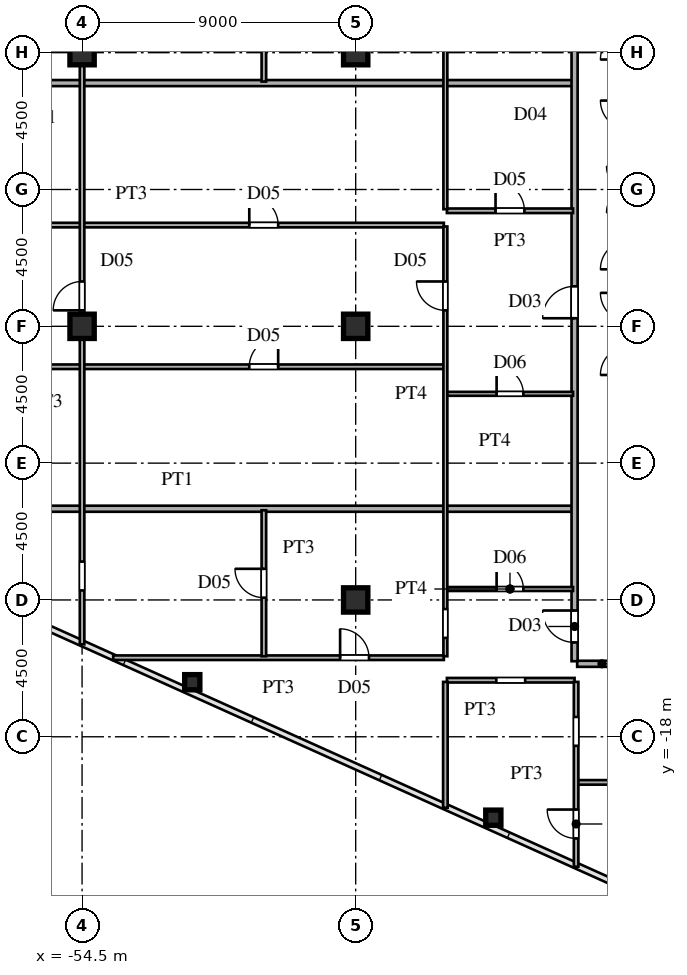
"""IFC4 building model, lengths in metres.
Left out: names, types, materials, properties, quantities, classifications, styles, units other than length and angle.
Written with IfcOpenShell. Run it as: python <this file> out.ifc"""

import sys

from ifc_helpers import new_model, si_unit, direction, frame, frame_2d, origin, origin_2d, place, context, subcontext, project, spatial, rectangle, hollow_rectangle, i_section, extrude, source, transform, mapped, element, fill, save


model = new_model("IFC4")
c1 = context("Model", 3, precision=1e-05, world=origin(), true_north=direction((0.0, 1.0)))
c2 = subcontext(c1, "Body", "Model", "MODEL_VIEW")
j1 = project(units=[si_unit("LENGTHUNIT", "METRE"), si_unit("PLANEANGLEUNIT", "RADIAN")], contexts=[c1])
p1 = place(None, origin())
s1 = spatial("IfcSite", under=j1, at=p1, CompositionType="ELEMENT")
p2 = place(p1, origin())
s2 = spatial("IfcBuilding", under=s1, at=p2, CompositionType="ELEMENT")
p3 = place(p2, frame((0.0, 0.0, 103.2)))
s3 = spatial("IfcBuildingStorey", under=s2, at=p3, CompositionType="ELEMENT", Elevation=103.2)
m1 = source(origin(), c2, "Body", "SweptSolid", [
    extrude(i_section(OverallWidth=0.8, OverallDepth=0.8, WebThickness=0.032, FlangeThickness=0.05, at=origin_2d()), origin(), (0.0, 0.0, 1.0), 3.6),
])
for number, where, z_axis, x_axis in (
    (1, (-45.5, -13.5, 0.0), (0.0, 0.0, 1.0), (1.0, 0.0, 0.0)),
    (2, (-45.5, -4.5, 0.0), (0.0, 0.0, 1.0), (1.0, 0.0, 0.0)),
    (3, (-45.5, 4.5, 0.0), (0.0, 0.0, 1.0), (1.0, 0.0, 0.0)),
    (4, (-54.5, -4.5, 0.0), (0.0, 0.0, 1.0), (1.0, 0.0, 0.0)),
    (5, (-54.5, 4.5, 0.0), (0.0, 0.0, 1.0), (1.0, 0.0, 0.0)),
):
    element("IfcColumn", number, at=place(p3, frame(where, z_axis=z_axis, x_axis=x_axis)), inside=s3, PredefinedType="COLUMN", context=c2, shape_type="MappedRepresentation", body=[
        mapped(m1, transform((0.0, 0.0, 0.0), scale=1.0)),
    ])
m2 = source(origin(), c2, "Body", "SweptSolid", [
    extrude(hollow_rectangle(XDim=0.5, YDim=0.5, WallThickness=0.02, at=origin_2d()), origin(), (0.0, 0.0, 1.0), 3.6),
])
for number, where, z_axis, x_axis in (
    (6, (-40.973, -20.661, 0.0), (0.0, 0.0, 1.0), (1.0, 0.0, 0.0)),
    (7, (-50.875, -16.205, 0.0), (0.0, 0.0, 1.0), (1.0, 0.0, 0.0)),
):
    element("IfcColumn", number, at=place(p3, frame(where, z_axis=z_axis, x_axis=x_axis)), inside=s3, PredefinedType="COLUMN", context=c2, shape_type="MappedRepresentation", body=[
        mapped(m2, transform((0.0, 0.0, 0.0), scale=1.0)),
    ])
p4 = place(p3, frame((-38.2, -19.5, 0.0), z_axis=(0.0, 0.0, 1.0), x_axis=(1.0, 0.0, 0.0)))
e8 = element("IfcWall", 8, at=p4, inside=s3, PredefinedType="PARTITIONING", context=c2, shape_type="SweptSolid", body=[
    extrude(rectangle(XDim=10.735, YDim=0.15, at=frame_2d((5.367, 0.0))), origin(), (0.0, 0.0, 1.0), 3.38),
])
p5 = place(p3, frame((-42.5, -16.14, 0.0), z_axis=(0.0, 0.0, 1.0), x_axis=(1.0, 0.0, 0.0)))
e9 = element("IfcWall", 9, at=p5, inside=s3, PredefinedType="PARTITIONING", context=c2, shape_type="SweptSolid", body=[
    extrude(rectangle(XDim=4.2, YDim=0.15, at=frame_2d((2.1, 0.0))), origin(), (0.0, 0.0, 1.0), 3.38),
])
p6 = place(p5, frame((1.625, 0.0, 0.0)))
e10 = element("IfcOpeningElement", 10, at=p6, cuts=e9, PredefinedType="OPENING", context=c2, shape_type="SweptSolid", body=[
    extrude(rectangle(XDim=0.95, YDim=2.15, at=frame_2d((0.475, 1.075))), frame((0.0, 0.085, 0.0), z_axis=(0.0, -1.0, 0.0), x_axis=(1.0, 0.0, 0.0)), (0.0, 0.0, 1.0), 0.17),
])
p7 = place(p3, frame((-38.215, -15.6, 0.0), z_axis=(0.0, 0.0, 1.0), x_axis=(1.0, 0.0, 0.0)))
e11 = element("IfcWall", 11, at=p7, inside=s3, PredefinedType="PARTITIONING", context=c2, shape_type="SweptSolid", body=[
    extrude(rectangle(XDim=1.63, YDim=0.2, at=frame_2d((0.815, 0.0))), origin(), (0.0, 0.0, 1.0), 3.38),
])
p8 = place(p3, frame((-53.477, -15.4, 0.0), z_axis=(0.0, 0.0, 1.0), x_axis=(1.0, 0.0, 0.0)))
e12 = element("IfcWall", 12, at=p8, inside=s3, PredefinedType="PARTITIONING", context=c2, shape_type="SweptSolid", body=[
    extrude(rectangle(XDim=10.877, YDim=0.15, at=frame_2d((5.438, 0.0))), origin(), (0.0, 0.0, 1.0), 3.38),
])
p9 = place(p8, frame((7.465, 0.0, 0.0)))
e13 = element("IfcOpeningElement", 13, at=p9, cuts=e12, PredefinedType="OPENING", context=c2, shape_type="SweptSolid", body=[
    extrude(rectangle(XDim=0.95, YDim=2.15, at=frame_2d((0.475, 1.075))), frame((0.0, 0.085, 0.0), z_axis=(0.0, -1.0, 0.0), x_axis=(1.0, 0.0, 0.0)), (0.0, 0.0, 1.0), 0.17),
])
p10 = place(p3, frame((-42.5, -13.14, 0.0), z_axis=(0.0, 0.0, 1.0), x_axis=(1.0, 0.0, 0.0)))
e14 = element("IfcWall", 14, at=p10, inside=s3, PredefinedType="PARTITIONING", context=c2, shape_type="SweptSolid", body=[
    extrude(rectangle(XDim=4.15, YDim=0.13, at=frame_2d((2.075, 0.0))), origin(), (0.0, 0.0, 1.0), 3.38),
])
p11 = place(p10, frame((1.635, 0.0, 0.0)))
e15 = element("IfcOpeningElement", 15, at=p11, cuts=e14, PredefinedType="OPENING", context=c2, shape_type="SweptSolid", body=[
    extrude(rectangle(XDim=0.88, YDim=2.1, at=frame_2d((0.44, 1.05))), frame((0.0, 0.075, 0.0), z_axis=(0.0, -1.0, 0.0), x_axis=(1.0, 0.0, 0.0)), (0.0, 0.0, 1.0), 0.15),
])
p12 = place(p3, frame((-64.346, -10.5, 0.0), z_axis=(0.0, 0.0, 1.0), x_axis=(1.0, 0.0, 0.0)))
e16 = element("IfcWall", 16, at=p12, inside=s3, PredefinedType="PARTITIONING", context=c2, shape_type="SweptSolid", body=[
    extrude(rectangle(XDim=25.966, YDim=0.2, at=frame_2d((12.983, 0.0))), origin(), (0.0, 0.0, 1.0), 3.38),
])
p13 = place(p3, frame((-42.5, -6.72, 0.0), z_axis=(0.0, 0.0, 1.0), x_axis=(1.0, 0.0, 0.0)))
e17 = element("IfcWall", 17, at=p13, inside=s3, PredefinedType="PARTITIONING", context=c2, shape_type="SweptSolid", body=[
    extrude(rectangle(XDim=4.15, YDim=0.13, at=frame_2d((2.075, 0.0))), origin(), (0.0, 0.0, 1.0), 3.38),
])
p14 = place(p13, frame((1.635, 0.0, 0.0)))
e18 = element("IfcOpeningElement", 18, at=p14, cuts=e17, PredefinedType="OPENING", context=c2, shape_type="SweptSolid", body=[
    extrude(rectangle(XDim=0.88, YDim=2.1, at=frame_2d((0.44, 1.05))), frame((0.0, 0.075, 0.0), z_axis=(0.0, -1.0, 0.0), x_axis=(1.0, 0.0, 0.0)), (0.0, 0.0, 1.0), 0.15),
])
p15 = place(p3, frame((-71.035, -5.83, 0.0), z_axis=(0.0, 0.0, 1.0), x_axis=(1.0, 0.0, 0.0)))
e19 = element("IfcWall", 19, at=p15, inside=s3, PredefinedType="PARTITIONING", context=c2, shape_type="SweptSolid", body=[
    extrude(rectangle(XDim=28.435, YDim=0.15, at=frame_2d((14.217, 0.0))), origin(), (0.0, 0.0, 1.0), 3.38),
])
p16 = place(p15, frame((22.035, 0.0, 0.0)))
e20 = element("IfcOpeningElement", 20, at=p16, cuts=e19, PredefinedType="OPENING", context=c2, shape_type="SweptSolid", body=[
    extrude(rectangle(XDim=0.95, YDim=2.15, at=frame_2d((0.475, 1.075))), frame((0.0, 0.085, 0.0), z_axis=(0.0, -1.0, 0.0), x_axis=(1.0, 0.0, 0.0)), (0.0, 0.0, 1.0), 0.17),
])
p17 = place(p15, frame((13.21, 0.0, 0.0)))
e21 = element("IfcOpeningElement", 21, at=p17, cuts=e19, PredefinedType="OPENING", context=c2, shape_type="SweptSolid", body=[
    extrude(rectangle(XDim=0.95, YDim=2.15, at=frame_2d((0.475, 1.075))), frame((0.0, 0.085, 0.0), z_axis=(0.0, -1.0, 0.0), x_axis=(1.0, 0.0, 0.0)), (0.0, 0.0, 1.0), 0.17),
])
p18 = place(p3, frame((-71.035, -1.17, 0.0), z_axis=(0.0, 0.0, 1.0), x_axis=(1.0, 0.0, 0.0)))
e22 = element("IfcWall", 22, at=p18, inside=s3, PredefinedType="PARTITIONING", context=c2, shape_type="SweptSolid", body=[
    extrude(rectangle(XDim=28.435, YDim=0.15, at=frame_2d((14.217, 0.0))), origin(), (0.0, 0.0, 1.0), 3.38),
])
p19 = place(p18, frame((22.035, 0.0, 0.0)))
e23 = element("IfcOpeningElement", 23, at=p19, cuts=e22, PredefinedType="OPENING", context=c2, shape_type="SweptSolid", body=[
    extrude(rectangle(XDim=0.95, YDim=2.15, at=frame_2d((0.475, 1.075))), frame((0.0, 0.085, 0.0), z_axis=(0.0, -1.0, 0.0), x_axis=(1.0, 0.0, 0.0)), (0.0, 0.0, 1.0), 0.17),
])
p20 = place(p18, frame((13.21, 0.0, 0.0)))
e24 = element("IfcOpeningElement", 24, at=p20, cuts=e22, PredefinedType="OPENING", context=c2, shape_type="SweptSolid", body=[
    extrude(rectangle(XDim=0.95, YDim=2.15, at=frame_2d((0.475, 1.075))), frame((0.0, 0.085, 0.0), z_axis=(0.0, -1.0, 0.0), x_axis=(1.0, 0.0, 0.0)), (0.0, 0.0, 1.0), 0.17),
])
p21 = place(p3, frame((-42.5, -0.7, 0.0), z_axis=(0.0, 0.0, 1.0), x_axis=(1.0, 0.0, 0.0)))
e25 = element("IfcWall", 25, at=p21, inside=s3, PredefinedType="PARTITIONING", context=c2, shape_type="SweptSolid", body=[
    extrude(rectangle(XDim=4.15, YDim=0.15, at=frame_2d((2.075, 0.0))), origin(), (0.0, 0.0, 1.0), 3.38),
])
p22 = place(p21, frame((1.6, 0.0, 0.0)))
e26 = element("IfcOpeningElement", 26, at=p22, cuts=e25, PredefinedType="OPENING", context=c2, shape_type="SweptSolid", body=[
    extrude(rectangle(XDim=0.95, YDim=2.15, at=frame_2d((0.475, 1.075))), frame((0.0, 0.085, 0.0), z_axis=(0.0, -1.0, 0.0), x_axis=(1.0, 0.0, 0.0)), (0.0, 0.0, 1.0), 0.17),
])
p23 = place(p3, frame((-71.005, 3.5, 0.0), z_axis=(0.0, 0.0, 1.0), x_axis=(1.0, 0.0, 0.0)))
e27 = element("IfcWall", 27, at=p23, inside=s3, PredefinedType="PARTITIONING", context=c2, shape_type="SweptSolid", body=[
    extrude(rectangle(XDim=32.625, YDim=0.2, at=frame_2d((16.312, 0.0))), origin(), (0.0, 0.0, 1.0), 3.38),
])
p24 = place(p3, frame((-54.5, -14.96, 0.0), z_axis=(0.0, 0.0, 1.0), x_axis=(0.0, 1.0, 0.0)))
e28 = element("IfcWall", 28, at=p24, inside=s3, PredefinedType="PARTITIONING", context=c2, shape_type="SweptSolid", body=[
    extrude(rectangle(XDim=29.612, YDim=0.15, at=frame_2d((14.806, 0.0))), origin(), (0.0, 0.0, 1.0), 2.68),
])
p25 = place(p24, frame((1.772, 0.0, 0.0)))
e29 = element("IfcOpeningElement", 29, at=p25, cuts=e28, PredefinedType="OPENING", context=c2, shape_type="SweptSolid", body=[
    extrude(rectangle(XDim=0.95, YDim=2.15, at=frame_2d((0.475, 1.075))), frame((0.0, 0.085, 0.0), z_axis=(0.0, -1.0, 0.0), x_axis=(1.0, 0.0, 0.0)), (0.0, 0.0, 1.0), 0.17),
])
p26 = place(p24, frame((10.985, 0.0, 0.0)))
e30 = element("IfcOpeningElement", 30, at=p26, cuts=e28, PredefinedType="OPENING", context=c2, shape_type="SweptSolid", body=[
    extrude(rectangle(XDim=0.95, YDim=2.15, at=frame_2d((0.475, 1.075))), frame((0.0, 0.085, 0.0), z_axis=(0.0, -1.0, 0.0), x_axis=(1.0, 0.0, 0.0)), (0.0, 0.0, 1.0), 0.17),
])
p27 = place(p24, frame((26.386, 0.0, 0.0)))
e31 = element("IfcOpeningElement", 31, at=p27, cuts=e28, PredefinedType="OPENING", context=c2, shape_type="SweptSolid", body=[
    extrude(rectangle(XDim=0.95, YDim=2.15, at=frame_2d((0.475, 1.075))), frame((0.0, 0.085, 0.0), z_axis=(0.0, -1.0, 0.0), x_axis=(1.0, 0.0, 0.0)), (0.0, 0.0, 1.0), 0.17),
])
p28 = place(p24, frame((20.785, 0.0, 0.0)))
e32 = element("IfcOpeningElement", 32, at=p28, cuts=e28, PredefinedType="OPENING", context=c2, shape_type="SweptSolid", body=[
    extrude(rectangle(XDim=0.95, YDim=2.15, at=frame_2d((0.475, 1.075))), frame((0.0, 0.085, 0.0), z_axis=(0.0, -1.0, 0.0), x_axis=(1.0, 0.0, 0.0)), (0.0, 0.0, 1.0), 0.17),
])
p29 = place(p3, frame((-48.52, -15.351, 0.0), z_axis=(0.0, 0.0, 1.0), x_axis=(0.0, 1.0, 0.0)))
e33 = element("IfcWall", 33, at=p29, inside=s3, PredefinedType="PARTITIONING", context=c2, shape_type="SweptSolid", body=[
    extrude(rectangle(XDim=4.801, YDim=0.15, at=frame_2d((2.4, 0.0))), origin(), (0.0, 0.0, 1.0), 3.38),
])
p30 = place(p29, frame((1.925, 0.0, 0.0)))
e34 = element("IfcOpeningElement", 34, at=p30, cuts=e33, PredefinedType="OPENING", context=c2, shape_type="SweptSolid", body=[
    extrude(rectangle(XDim=0.95, YDim=2.15, at=frame_2d((0.475, 1.075))), frame((0.0, 0.085, 0.0), z_axis=(0.0, -1.0, 0.0), x_axis=(1.0, 0.0, 0.0)), (0.0, 0.0, 1.0), 0.17),
])
p31 = place(p3, frame((-48.52, 3.55, 0.0), z_axis=(0.0, 0.0, 1.0), x_axis=(0.0, 1.0, 0.0)))
e35 = element("IfcWall", 35, at=p31, inside=s3, PredefinedType="PARTITIONING", context=c2, shape_type="SweptSolid", body=[
    extrude(rectangle(XDim=11.102, YDim=0.15, at=frame_2d((5.551, 0.0))), origin(), (0.0, 0.0, 1.0), 3.38),
])
p32 = place(p31, frame((7.876, 0.0, 0.0)))
e36 = element("IfcOpeningElement", 36, at=p32, cuts=e35, PredefinedType="OPENING", context=c2, shape_type="SweptSolid", body=[
    extrude(rectangle(XDim=0.95, YDim=2.15, at=frame_2d((0.475, 1.075))), frame((0.0, 0.085, 0.0), z_axis=(0.0, -1.0, 0.0), x_axis=(1.0, 0.0, 0.0)), (0.0, 0.0, 1.0), 0.17),
])
p33 = place(p31, frame((2.275, 0.0, 0.0)))
e37 = element("IfcOpeningElement", 37, at=p33, cuts=e35, PredefinedType="OPENING", context=c2, shape_type="SweptSolid", body=[
    extrude(rectangle(XDim=0.95, YDim=2.15, at=frame_2d((0.475, 1.075))), frame((0.0, 0.085, 0.0), z_axis=(0.0, -1.0, 0.0), x_axis=(1.0, 0.0, 0.0)), (0.0, 0.0, 1.0), 0.17),
])
p34 = place(p3, frame((-42.55, -20.337, 0.0), z_axis=(0.0, 0.0, 1.0), x_axis=(0.0, 1.0, 0.0)))
e38 = element("IfcWall", 38, at=p34, inside=s3, PredefinedType="PARTITIONING", context=c2, shape_type="SweptSolid", body=[
    extrude(rectangle(XDim=4.142, YDim=0.15, at=frame_2d((2.071, 0.0))), origin(), (0.0, 0.0, 1.0), 3.38),
])
p35 = place(p3, frame((-42.55, -15.351, 0.0), z_axis=(0.0, 0.0, 1.0), x_axis=(0.0, 1.0, 0.0)))
e39 = element("IfcWall", 39, at=p35, inside=s3, PredefinedType="PARTITIONING", context=c2, shape_type="SweptSolid", body=[
    extrude(rectangle(XDim=14.134, YDim=0.13, at=frame_2d((7.067, 0.0))), origin(), (0.0, 0.0, 1.0), 3.38),
])
p36 = place(p35, frame((0.603, 0.0, 0.0)))
e40 = element("IfcOpeningElement", 40, at=p36, cuts=e39, PredefinedType="OPENING", context=c2, shape_type="SweptSolid", body=[
    extrude(rectangle(XDim=0.95, YDim=2.15, at=frame_2d((0.475, 1.075))), frame((0.0, 0.075, 0.0), z_axis=(0.0, -1.0, 0.0), x_axis=(1.0, 0.0, 0.0)), (0.0, 0.0, 1.0), 0.15),
])
p37 = place(p35, frame((11.376, 0.0, 0.0)))
e41 = element("IfcOpeningElement", 41, at=p37, cuts=e39, PredefinedType="OPENING", context=c2, shape_type="SweptSolid", body=[
    extrude(rectangle(XDim=0.95, YDim=2.15, at=frame_2d((0.475, 1.075))), frame((0.0, 0.075, 0.0), z_axis=(0.0, -1.0, 0.0), x_axis=(1.0, 0.0, 0.0)), (0.0, 0.0, 1.0), 0.15),
])
p38 = place(p3, frame((-42.55, -0.648, 0.0), z_axis=(0.0, 0.0, 1.0), x_axis=(0.0, 1.0, 0.0)))
e42 = element("IfcWall", 42, at=p38, inside=s3, PredefinedType="PARTITIONING", context=c2, shape_type="SweptSolid", body=[
    extrude(rectangle(XDim=20.985, YDim=0.13, at=frame_2d((10.492, 0.0))), origin(), (0.0, 0.0, 1.0), 3.38),
])
p39 = place(p38, frame((10.262, 0.0, 0.0)))
e43 = element("IfcOpeningElement", 43, at=p39, cuts=e42, PredefinedType="OPENING", context=c2, shape_type="SweptSolid", body=[
    extrude(rectangle(XDim=0.95, YDim=2.15, at=frame_2d((0.475, 1.075))), frame((0.0, 0.075, 0.0), z_axis=(0.0, -1.0, 0.0), x_axis=(1.0, 0.0, 0.0)), (0.0, 0.0, 1.0), 0.15),
])
p40 = place(p38, frame((18.653, 0.0, 0.0)))
e44 = element("IfcOpeningElement", 44, at=p40, cuts=e42, PredefinedType="OPENING", context=c2, shape_type="SweptSolid", body=[
    extrude(rectangle(XDim=0.95, YDim=2.15, at=frame_2d((0.475, 1.075))), frame((0.0, 0.075, 0.0), z_axis=(0.0, -1.0, 0.0), x_axis=(1.0, 0.0, 0.0)), (0.0, 0.0, 1.0), 0.15),
])
p41 = place(p3, frame((-38.3, -15.515, 0.0), z_axis=(0.0, 0.0, 1.0), x_axis=(0.0, 1.0, 0.0)))
e45 = element("IfcWall", 45, at=p41, inside=s3, PredefinedType="PARTITIONING", context=c2, shape_type="SweptSolid", body=[
    extrude(rectangle(XDim=31.03, YDim=0.2, at=frame_2d((15.515, 0.0))), origin(), (0.0, 0.0, 1.0), 3.38),
])
p42 = place(p41, frame((0.617, 0.0, 0.0)))
e46 = element("IfcOpeningElement", 46, at=p42, cuts=e45, PredefinedType="OPENING", context=c2, shape_type="SweptSolid", body=[
    extrude(rectangle(XDim=1.05, YDim=2.25, at=frame_2d((0.525, 1.125))), frame((0.0, 0.11, 0.0), z_axis=(0.0, -1.0, 0.0), x_axis=(1.0, 0.0, 0.0)), (0.0, 0.0, 1.0), 0.22),
])
p43 = place(p41, frame((11.28, 0.0, 0.0)))
e47 = element("IfcOpeningElement", 47, at=p43, cuts=e45, PredefinedType="OPENING", context=c2, shape_type="SweptSolid", body=[
    extrude(rectangle(XDim=1.05, YDim=2.25, at=frame_2d((0.525, 1.125))), frame((0.0, 0.11, 0.0), z_axis=(0.0, -1.0, 0.0), x_axis=(1.0, 0.0, 0.0)), (0.0, 0.0, 1.0), 0.22),
])
p44 = place(p41, frame((24.567, 0.0, 0.0)))
e48 = element("IfcOpeningElement", 48, at=p44, cuts=e45, PredefinedType="OPENING", context=c2, shape_type="SweptSolid", body=[
    extrude(rectangle(XDim=1.05, YDim=2.25, at=frame_2d((0.525, 1.125))), frame((0.0, 0.11, 0.0), z_axis=(0.0, -1.0, 0.0), x_axis=(1.0, 0.0, 0.0)), (0.0, 0.0, 1.0), 0.22),
])
p45 = place(p3, frame((-38.25, -22.273, 0.0), z_axis=(0.0, 0.0, 1.0), x_axis=(0.0, 1.0, 0.0)))
e49 = element("IfcWall", 49, at=p45, inside=s3, PredefinedType="PARTITIONING", context=c2, shape_type="SweptSolid", body=[
    extrude(rectangle(XDim=6.078, YDim=0.15, at=frame_2d((3.039, 0.0))), origin(), (0.0, 0.0, 1.0), 3.38),
])
p46 = place(p45, frame((0.929, 0.0, 0.0)))
e50 = element("IfcOpeningElement", 50, at=p46, cuts=e49, PredefinedType="OPENING", context=c2, shape_type="SweptSolid", body=[
    extrude(rectangle(XDim=0.95, YDim=2.15, at=frame_2d((0.475, 1.075))), frame((0.0, 0.085, 0.0), z_axis=(0.0, -1.0, 0.0), x_axis=(1.0, 0.0, 0.0)), (0.0, 0.0, 1.0), 0.17),
])
p47 = place(p45, frame((3.976, 0.0, 0.0)))
e51 = element("IfcOpeningElement", 51, at=p47, cuts=e49, PredefinedType="OPENING", context=c2, shape_type="SweptSolid", body=[
    extrude(rectangle(XDim=0.95, YDim=2.15, at=frame_2d((0.475, 1.075))), frame((0.0, 0.085, 0.0), z_axis=(0.0, -1.0, 0.0), x_axis=(1.0, 0.0, 0.0)), (0.0, 0.0, 1.0), 0.17),
])
m3 = source(origin(), c2, "Body", "SweptSolid", [
    extrude(rectangle(XDim=0.95, YDim=2.15, at=frame_2d((0.475, 1.075))), frame((0.0, 0.025, 0.0), z_axis=(0.0, -1.0, 0.0), x_axis=(1.0, 0.0, 0.0)), (0.0, 0.0, 1.0), 0.05),
])
p48 = place(p9, origin())
e52 = element("IfcDoor", 52, at=p48, inside=s3, OperationType="SINGLE_SWING_LEFT", PredefinedType="DOOR", context=c2, shape_type="MappedRepresentation", body=[
    mapped(m3, transform((0.0, 0.0, 0.0), scale=1.0)),
])
fill(e13, e52)
m4 = source(origin(), c2, "Body", "SweptSolid", [
    extrude(rectangle(XDim=0.88, YDim=2.1, at=frame_2d((0.44, 1.05))), frame((0.0, 0.025, 0.0), z_axis=(0.0, -1.0, 0.0), x_axis=(1.0, 0.0, 0.0)), (0.0, 0.0, 1.0), 0.05),
])
p49 = place(p11, origin())
e53 = element("IfcDoor", 53, at=p49, inside=s3, OperationType="SINGLE_SWING_LEFT", PredefinedType="DOOR", context=c2, shape_type="MappedRepresentation", body=[
    mapped(m4, transform((0.0, 0.0, 0.0), scale=1.0)),
])
fill(e15, e53)
p50 = place(p14, origin())
e54 = element("IfcDoor", 54, at=p50, inside=s3, OperationType="SINGLE_SWING_LEFT", PredefinedType="DOOR", context=c2, shape_type="MappedRepresentation", body=[
    mapped(m4, transform((0.0, 0.0, 0.0), scale=1.0)),
])
fill(e18, e54)
p51 = place(p16, origin())
e55 = element("IfcDoor", 55, at=p51, inside=s3, OperationType="SINGLE_SWING_RIGHT", PredefinedType="DOOR", context=c2, shape_type="MappedRepresentation", body=[
    mapped(m3, transform((0.0, 0.0, 0.0), scale=1.0)),
])
fill(e20, e55)
p52 = place(p19, origin())
e56 = element("IfcDoor", 56, at=p52, inside=s3, OperationType="SINGLE_SWING_LEFT", PredefinedType="DOOR", context=c2, shape_type="MappedRepresentation", body=[
    mapped(m3, transform((0.0, 0.0, 0.0), scale=1.0)),
])
fill(e23, e56)
p53 = place(p22, origin())
e57 = element("IfcDoor", 57, at=p53, inside=s3, OperationType="SINGLE_SWING_LEFT", PredefinedType="DOOR", context=c2, shape_type="MappedRepresentation", body=[
    mapped(m3, transform((0.0, 0.0, 0.0), scale=1.0)),
])
fill(e26, e57)
p54 = place(p26, origin())
e58 = element("IfcDoor", 58, at=p54, inside=s3, OperationType="SINGLE_SWING_LEFT", PredefinedType="DOOR", context=c2, shape_type="MappedRepresentation", body=[
    mapped(m3, transform((0.0, 0.0, 0.0), scale=1.0)),
])
fill(e30, e58)
p55 = place(p30, origin())
e59 = element("IfcDoor", 59, at=p55, inside=s3, OperationType="SINGLE_SWING_RIGHT", PredefinedType="DOOR", context=c2, shape_type="MappedRepresentation", body=[
    mapped(m3, transform((0.0, 0.0, 0.0), scale=1.0)),
])
fill(e34, e59)
p56 = place(p37, origin())
e60 = element("IfcDoor", 60, at=p56, inside=s3, OperationType="SINGLE_SWING_RIGHT", PredefinedType="DOOR", context=c2, shape_type="MappedRepresentation", body=[
    mapped(m3, transform((0.0, 0.0, 0.0), scale=1.0)),
])
fill(e41, e60)
m5 = source(origin(), c2, "Body", "SweptSolid", [
    extrude(rectangle(XDim=1.05, YDim=2.25, at=frame_2d((0.525, 1.125))), frame((0.0, 0.025, 0.0), z_axis=(0.0, -1.0, 0.0), x_axis=(1.0, 0.0, 0.0)), (0.0, 0.0, 1.0), 0.05),
])
p57 = place(p42, origin())
e61 = element("IfcDoor", 61, at=p57, inside=s3, OperationType="SINGLE_SWING_RIGHT", PredefinedType="DOOR", context=c2, shape_type="MappedRepresentation", body=[
    mapped(m5, transform((0.0, 0.0, 0.0), scale=1.0)),
])
fill(e46, e61)
p58 = place(p43, origin())
e62 = element("IfcDoor", 62, at=p58, inside=s3, OperationType="SINGLE_SWING_LEFT", PredefinedType="DOOR", context=c2, shape_type="MappedRepresentation", body=[
    mapped(m5, transform((0.0, 0.0, 0.0), scale=1.0)),
])
fill(e47, e62)
p59 = place(p46, origin())
e63 = element("IfcDoor", 63, at=p59, inside=s3, OperationType="SINGLE_SWING_RIGHT", PredefinedType="DOOR", context=c2, shape_type="MappedRepresentation", body=[
    mapped(m3, transform((0.0, 0.0, 0.0), scale=1.0)),
])
fill(e50, e63)
save(model, sys.argv[1])
